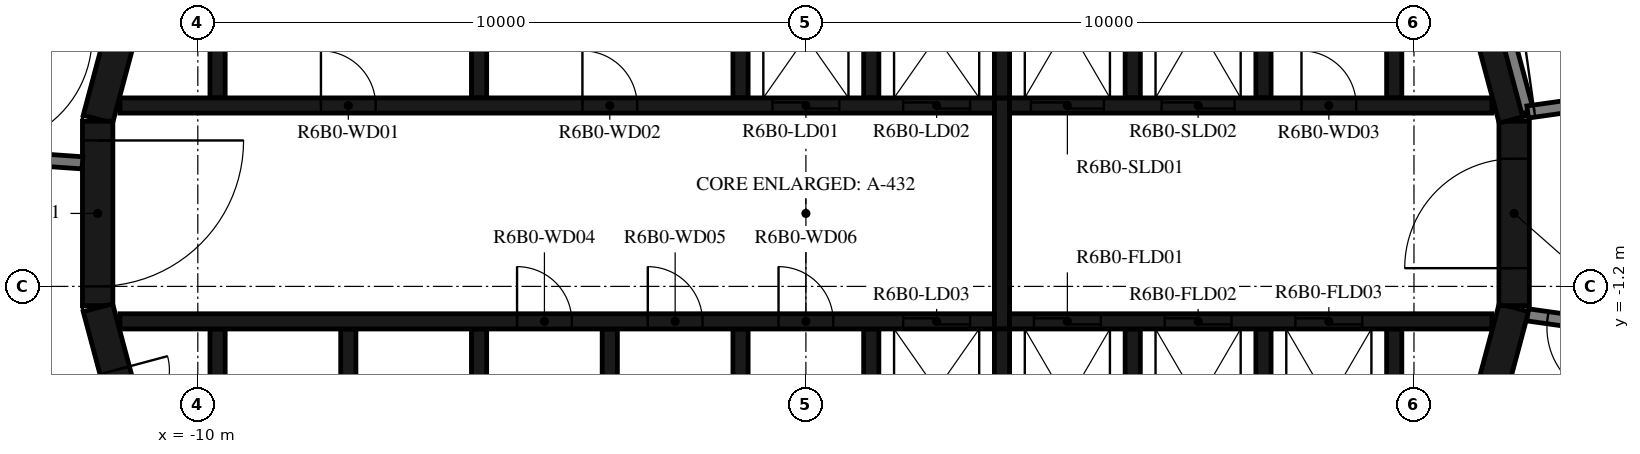
"""IFC4 building model, lengths in metres.
Left out: names, types, materials, properties, quantities, classifications, styles, units other than length and angle.
Written with IfcOpenShell. Run it as: python <this file> out.ifc"""

import sys

from ifc_helpers import new_model, si_unit, direction, frame, frame_2d, origin, place, context, subcontext, project, spatial, polyline, rectangle, outline, extrude, element, fill, save


model = new_model("IFC4")
c1 = context("Model", 3, precision=1e-05, world=origin(), true_north=direction((0.0, 1.0)))
c2 = subcontext(c1, "Body", "Model", "MODEL_VIEW")
j1 = project(units=[si_unit("LENGTHUNIT", "METRE"), si_unit("PLANEANGLEUNIT", "RADIAN")], contexts=[c1])
p1 = place(None, origin())
s1 = spatial("IfcSite", under=j1, at=p1, CompositionType="ELEMENT")
p2 = place(p1, origin())
s2 = spatial("IfcBuilding", under=s1, at=p2, CompositionType="ELEMENT")
p3 = place(p2, frame((0.0, 0.0, 240.7)))
s3 = spatial("IfcBuildingStorey", under=s2, at=p3, CompositionType="ELEMENT", Elevation=240.7)
p4 = place(p3, frame((10.858, -4.479, 0.0), z_axis=(0.0, 0.0, 1.0), x_axis=(0.258734743916, 0.965948410781, 0.0)))
e1 = element("IfcWall", 1, at=p4, inside=s3, PredefinedType="SHEAR", context=c2, shape_type="SweptSolid", body=[
    extrude(rectangle(XDim=3.033, YDim=0.5, at=frame_2d((1.516, 0.0))), origin(), (0.0, 0.0, 1.0), 3.12),
])
p5 = place(p3, frame((11.647, -1.516, 0.0), z_axis=(0.0, 0.0, 1.0), x_axis=(0.0, 1.0, 0.0)))
e2 = element("IfcWall", 2, at=p5, inside=s3, PredefinedType="SHEAR", context=c2, shape_type="SweptSolid", body=[
    extrude(rectangle(XDim=3.033, YDim=0.5, at=frame_2d((1.516, 0.0))), origin(), (0.0, 0.0, 1.0), 3.12),
])
p6 = place(p5, frame((0.616, 0.0, 0.0)))
e3 = element("IfcOpeningElement", 3, at=p6, cuts=e2, PredefinedType="OPENING", context=c2, shape_type="SweptSolid", body=[
    extrude(rectangle(XDim=1.8, YDim=2.1, at=frame_2d((0.9, 1.05))), frame((0.0, 0.26, 0.0), z_axis=(0.0, -1.0, 0.0), x_axis=(1.0, 0.0, 0.0)), (0.0, 0.0, 1.0), 0.52),
])
for number, where, z_axis, x_axis in (
    (4, (11.643, 1.55, 0.0), (0.0, 0.0, 1.0), (-0.259, 0.966, 0.0)),
    (5, (-10.858, 4.479, 0.0), (0.0, 0.0, 1.0), (-0.259, -0.966, 0.0)),
):
    element("IfcWall", number, at=place(p3, frame(where, z_axis=z_axis, x_axis=x_axis)), inside=s3, PredefinedType="SHEAR", context=c2, shape_type="SweptSolid", body=[
        extrude(rectangle(XDim=3.033, YDim=0.5, at=frame_2d((1.516, 0.0))), origin(), (0.0, 0.0, 1.0), 3.12),
    ])
p7 = place(p3, frame((-11.647, 1.516, 0.0), z_axis=(0.0, 0.0, 1.0), x_axis=(0.0, -1.0, 0.0)))
e6 = element("IfcWall", 6, at=p7, inside=s3, PredefinedType="SHEAR", context=c2, shape_type="SweptSolid", body=[
    extrude(rectangle(XDim=3.033, YDim=0.5, at=frame_2d((1.516, 0.0))), origin(), (0.0, 0.0, 1.0), 3.12),
])
p8 = place(p7, frame((0.316, 0.0, 0.0)))
e7 = element("IfcOpeningElement", 7, at=p8, cuts=e6, PredefinedType="OPENING", context=c2, shape_type="SweptSolid", body=[
    extrude(rectangle(XDim=2.4, YDim=2.1, at=frame_2d((1.2, 1.05))), frame((0.0, 0.26, 0.0), z_axis=(0.0, -1.0, 0.0), x_axis=(1.0, 0.0, 0.0)), (0.0, 0.0, 1.0), 0.52),
])
p9 = place(p3, frame((-11.643, -1.55, 0.0), z_axis=(0.0, 0.0, 1.0), x_axis=(0.258734743916, -0.965948410781, 0.0)))
e8 = element("IfcWall", 8, at=p9, inside=s3, PredefinedType="SHEAR", context=c2, shape_type="SweptSolid", body=[
    extrude(rectangle(XDim=3.033, YDim=0.5, at=frame_2d((1.516, 0.0))), origin(), (0.0, 0.0, 1.0), 3.12),
])
p10 = place(p9, frame((1.066, 0.0, 0.0)))
e9 = element("IfcOpeningElement", 9, at=p10, cuts=e8, PredefinedType="OPENING", context=c2, shape_type="SweptSolid", body=[
    extrude(rectangle(XDim=0.9, YDim=2.1, at=frame_2d((0.45, 1.05))), frame((0.0, 0.26, 0.0), z_axis=(0.0, -1.0, 0.0), x_axis=(1.0, 0.0, 0.0)), (0.0, 0.0, 1.0), 0.52),
])
p11 = place(p3, origin())
e10 = element("IfcWall", 10, at=p11, inside=s3, PredefinedType="SHEAR", context=c2, shape_type="SweptSolid", body=[
    extrude(outline(polyline([(-9.55, 4.8), (-5.5, 4.8), (-5.5, 1.9), (-5.25, 1.9), (-5.25, 4.8), (-1.2, 4.8), (-1.2, 1.9), (-0.95, 1.9), (-0.95, 4.8), (0.95, 4.8), (0.95, 1.9), (1.2, 1.9), (1.2, 4.8), (3.1, 4.8), (3.1, 1.9), (3.35, 1.9), (3.35, 4.8), (5.25, 4.8), (5.25, 1.9), (5.5, 1.9), (5.5, 4.8), (7.4, 4.8), (7.4, 1.9), (7.65, 1.9), (7.65, 4.8), (9.55, 4.8), (9.55, 1.9), (9.8, 1.9), (9.8, 4.8), (9.8, 5.05), (-9.8, 5.05), (-9.8, 4.8), (-9.8, 1.9), (-9.55, 1.9), (-9.55, 4.8)])), origin(), (0.0, 0.0, 1.0), 3.12),
])
p12 = place(p3, origin())
e11 = element("IfcWall", 11, at=p12, inside=s3, PredefinedType="SHEAR", context=c2, shape_type="SweptSolid", body=[
    extrude(outline(polyline([(9.8, -5.05), (9.8, -4.8), (9.8, -1.9), (9.55, -1.9), (9.55, -4.8), (7.65, -4.8), (7.65, -1.9), (7.4, -1.9), (7.4, -4.8), (5.5, -4.8), (5.5, -1.9), (5.25, -1.9), (5.25, -4.8), (3.35, -4.8), (3.35, -1.9), (3.1, -1.9), (3.1, -4.8), (1.2, -4.8), (1.2, -1.9), (0.95, -1.9), (0.95, -4.8), (-0.95, -4.8), (-0.95, -1.9), (-1.2, -1.9), (-1.2, -4.8), (-3.1, -4.8), (-3.1, -1.9), (-3.35, -1.9), (-3.35, -4.8), (-5.25, -4.8), (-5.25, -1.9), (-5.5, -1.9), (-5.5, -4.8), (-7.4, -4.8), (-7.4, -1.9), (-7.65, -1.9), (-7.65, -4.8), (-9.55, -4.8), (-9.55, -1.9), (-9.8, -1.9), (-9.8, -4.8), (-9.8, -5.05), (9.8, -5.05)])), origin(), (0.0, 0.0, 1.0), 3.12),
])
p13 = place(p3, frame((-11.28, 1.775, 0.0), z_axis=(0.0, 0.0, 1.0), x_axis=(1.0, 0.0, 0.0)))
e12 = element("IfcWall", 12, at=p13, inside=s3, PredefinedType="SHEAR", context=c2, shape_type="SweptSolid", body=[
    extrude(rectangle(XDim=14.38, YDim=0.25, at=frame_2d((7.19, 0.0))), origin(), (0.0, 0.0, 1.0), 3.12),
])
p14 = place(p13, frame((10.73, 0.0, 0.0)))
e13 = element("IfcOpeningElement", 13, at=p14, cuts=e12, PredefinedType="OPENING", context=c2, shape_type="SweptSolid", body=[
    extrude(rectangle(XDim=1.1, YDim=2.1, at=frame_2d((0.55, 1.05))), frame((0.0, 0.135, 0.0), z_axis=(0.0, -1.0, 0.0), x_axis=(1.0, 0.0, 0.0)), (0.0, 0.0, 1.0), 0.27),
])
p15 = place(p13, frame((12.88, 0.0, 0.0)))
e14 = element("IfcOpeningElement", 14, at=p15, cuts=e12, PredefinedType="OPENING", context=c2, shape_type="SweptSolid", body=[
    extrude(rectangle(XDim=1.1, YDim=2.1, at=frame_2d((0.55, 1.05))), frame((0.0, 0.135, 0.0), z_axis=(0.0, -1.0, 0.0), x_axis=(1.0, 0.0, 0.0)), (0.0, 0.0, 1.0), 0.27),
])
p16 = place(p13, frame((3.305, 0.0, 0.0)))
e15 = element("IfcOpeningElement", 15, at=p16, cuts=e12, PredefinedType="OPENING", context=c2, shape_type="SweptSolid", body=[
    extrude(rectangle(XDim=0.9, YDim=2.1, at=frame_2d((0.45, 1.05))), frame((0.0, 0.135, 0.0), z_axis=(0.0, -1.0, 0.0), x_axis=(1.0, 0.0, 0.0)), (0.0, 0.0, 1.0), 0.27),
])
p17 = place(p13, frame((7.605, 0.0, 0.0)))
e16 = element("IfcOpeningElement", 16, at=p17, cuts=e12, PredefinedType="OPENING", context=c2, shape_type="SweptSolid", body=[
    extrude(rectangle(XDim=0.9, YDim=2.1, at=frame_2d((0.45, 1.05))), frame((0.0, 0.135, 0.0), z_axis=(0.0, -1.0, 0.0), x_axis=(1.0, 0.0, 0.0)), (0.0, 0.0, 1.0), 0.27),
])
p18 = place(p3, frame((3.35, 1.775, 0.0), z_axis=(0.0, 0.0, 1.0), x_axis=(1.0, 0.0, 0.0)))
e17 = element("IfcWall", 17, at=p18, inside=s3, PredefinedType="SHEAR", context=c2, shape_type="SweptSolid", body=[
    extrude(rectangle(XDim=7.93, YDim=0.25, at=frame_2d((3.965, 0.0))), origin(), (0.0, 0.0, 1.0), 3.12),
])
p19 = place(p18, frame((0.35, 0.0, 0.0)))
e18 = element("IfcOpeningElement", 18, at=p19, cuts=e17, PredefinedType="OPENING", context=c2, shape_type="SweptSolid", body=[
    extrude(rectangle(XDim=1.2, YDim=2.4, at=frame_2d((0.6, 1.2))), frame((0.0, 0.135, 0.0), z_axis=(0.0, -1.0, 0.0), x_axis=(1.0, 0.0, 0.0)), (0.0, 0.0, 1.0), 0.27),
])
p20 = place(p18, frame((2.5, 0.0, 0.0)))
e19 = element("IfcOpeningElement", 19, at=p20, cuts=e17, PredefinedType="OPENING", context=c2, shape_type="SweptSolid", body=[
    extrude(rectangle(XDim=1.2, YDim=2.4, at=frame_2d((0.6, 1.2))), frame((0.0, 0.135, 0.0), z_axis=(0.0, -1.0, 0.0), x_axis=(1.0, 0.0, 0.0)), (0.0, 0.0, 1.0), 0.27),
])
p21 = place(p18, frame((4.8, 0.0, 0.0)))
e20 = element("IfcOpeningElement", 20, at=p21, cuts=e17, PredefinedType="OPENING", context=c2, shape_type="SweptSolid", body=[
    extrude(rectangle(XDim=0.9, YDim=2.1, at=frame_2d((0.45, 1.05))), frame((0.0, 0.135, 0.0), z_axis=(0.0, -1.0, 0.0), x_axis=(1.0, 0.0, 0.0)), (0.0, 0.0, 1.0), 0.27),
])
p22 = place(p3, frame((-11.28, -1.775, 0.0), z_axis=(0.0, 0.0, 1.0), x_axis=(1.0, 0.0, 0.0)))
e21 = element("IfcWall", 21, at=p22, inside=s3, PredefinedType="SHEAR", context=c2, shape_type="SweptSolid", body=[
    extrude(rectangle(XDim=14.38, YDim=0.25, at=frame_2d((7.19, 0.0))), origin(), (0.0, 0.0, 1.0), 3.12),
])
p23 = place(p22, frame((12.88, 0.0, 0.0)))
e22 = element("IfcOpeningElement", 22, at=p23, cuts=e21, PredefinedType="OPENING", context=c2, shape_type="SweptSolid", body=[
    extrude(rectangle(XDim=1.1, YDim=2.1, at=frame_2d((0.55, 1.05))), frame((0.0, 0.135, 0.0), z_axis=(0.0, -1.0, 0.0), x_axis=(1.0, 0.0, 0.0)), (0.0, 0.0, 1.0), 0.27),
])
p24 = place(p22, frame((6.53, 0.0, 0.0)))
e23 = element("IfcOpeningElement", 23, at=p24, cuts=e21, PredefinedType="OPENING", context=c2, shape_type="SweptSolid", body=[
    extrude(rectangle(XDim=0.9, YDim=2.1, at=frame_2d((0.45, 1.05))), frame((0.0, 0.135, 0.0), z_axis=(0.0, -1.0, 0.0), x_axis=(1.0, 0.0, 0.0)), (0.0, 0.0, 1.0), 0.27),
])
p25 = place(p22, frame((8.68, 0.0, 0.0)))
e24 = element("IfcOpeningElement", 24, at=p25, cuts=e21, PredefinedType="OPENING", context=c2, shape_type="SweptSolid", body=[
    extrude(rectangle(XDim=0.9, YDim=2.1, at=frame_2d((0.45, 1.05))), frame((0.0, 0.135, 0.0), z_axis=(0.0, -1.0, 0.0), x_axis=(1.0, 0.0, 0.0)), (0.0, 0.0, 1.0), 0.27),
])
p26 = place(p22, frame((10.83, 0.0, 0.0)))
e25 = element("IfcOpeningElement", 25, at=p26, cuts=e21, PredefinedType="OPENING", context=c2, shape_type="SweptSolid", body=[
    extrude(rectangle(XDim=0.9, YDim=2.1, at=frame_2d((0.45, 1.05))), frame((0.0, 0.135, 0.0), z_axis=(0.0, -1.0, 0.0), x_axis=(1.0, 0.0, 0.0)), (0.0, 0.0, 1.0), 0.27),
])
p27 = place(p3, frame((3.35, -1.775, 0.0), z_axis=(0.0, 0.0, 1.0), x_axis=(1.0, 0.0, 0.0)))
e26 = element("IfcWall", 26, at=p27, inside=s3, PredefinedType="SHEAR", context=c2, shape_type="SweptSolid", body=[
    extrude(rectangle(XDim=7.93, YDim=0.25, at=frame_2d((3.965, 0.0))), origin(), (0.0, 0.0, 1.0), 3.12),
])
p28 = place(p27, frame((0.4, 0.0, 0.0)))
e27 = element("IfcOpeningElement", 27, at=p28, cuts=e26, PredefinedType="OPENING", context=c2, shape_type="SweptSolid", body=[
    extrude(rectangle(XDim=1.1, YDim=2.4, at=frame_2d((0.55, 1.2))), frame((0.0, 0.135, 0.0), z_axis=(0.0, -1.0, 0.0), x_axis=(1.0, 0.0, 0.0)), (0.0, 0.0, 1.0), 0.27),
])
p29 = place(p27, frame((2.55, 0.0, 0.0)))
e28 = element("IfcOpeningElement", 28, at=p29, cuts=e26, PredefinedType="OPENING", context=c2, shape_type="SweptSolid", body=[
    extrude(rectangle(XDim=1.1, YDim=2.4, at=frame_2d((0.55, 1.2))), frame((0.0, 0.135, 0.0), z_axis=(0.0, -1.0, 0.0), x_axis=(1.0, 0.0, 0.0)), (0.0, 0.0, 1.0), 0.27),
])
p30 = place(p27, frame((4.7, 0.0, 0.0)))
e29 = element("IfcOpeningElement", 29, at=p30, cuts=e26, PredefinedType="OPENING", context=c2, shape_type="SweptSolid", body=[
    extrude(rectangle(XDim=1.1, YDim=2.4, at=frame_2d((0.55, 1.2))), frame((0.0, 0.135, 0.0), z_axis=(0.0, -1.0, 0.0), x_axis=(1.0, 0.0, 0.0)), (0.0, 0.0, 1.0), 0.27),
])
p31 = place(p3, frame((3.225, -1.9, 0.0), z_axis=(0.0, 0.0, 1.0), x_axis=(0.0, 1.0, 0.0)))
e30 = element("IfcWall", 30, at=p31, inside=s3, PredefinedType="SHEAR", context=c2, shape_type="SweptSolid", body=[
    extrude(rectangle(XDim=3.8, YDim=0.25, at=frame_2d((1.9, 0.0))), origin(), (0.0, 0.0, 1.0), 3.12),
])
p32 = place(p3, frame((11.87, 1.668, 0.0), z_axis=(0.0, 0.0, 1.0), x_axis=(-0.258836880648, 0.965921047093, 0.0)))
e31 = element("IfcWall", 31, at=p32, inside=s3, PredefinedType="STANDARD", context=c2, shape_type="SweptSolid", body=[
    extrude(rectangle(XDim=1.695, YDim=0.2, at=frame_2d((0.848, 0.0))), origin(), (0.0, 0.0, 1.0), 3.12),
])
p33 = place(p3, frame((11.87, 1.668, 0.0), z_axis=(0.0, 0.0, 1.0), x_axis=(0.990267985606, 0.139173692496, 0.0)))
e32 = element("IfcWall", 32, at=p33, inside=s3, PredefinedType="STANDARD", context=c2, shape_type="SweptSolid", body=[
    extrude(rectangle(XDim=1.475, YDim=0.2, at=frame_2d((0.738, 0.0))), origin(), (0.0, 0.0, 1.0), 3.12),
])
p34 = place(p33, frame((0.11, 0.0, 0.0)))
e33 = element("IfcOpeningElement", 33, at=p34, cuts=e32, PredefinedType="OPENING", context=c2, shape_type="SweptSolid", body=[
    extrude(rectangle(XDim=1.2, YDim=2.1, at=frame_2d((0.6, 1.05))), frame((0.0, 0.11, 0.0), z_axis=(0.0, -1.0, 0.0), x_axis=(1.0, 0.0, 0.0)), (0.0, 0.0, 1.0), 0.22),
])
p35 = place(p3, frame((-13.454, 0.941, 0.0), z_axis=(0.0, 0.0, 1.0), x_axis=(0.99755155062, -0.069934997354, 0.0)))
e34 = element("IfcWall", 34, at=p35, inside=s3, PredefinedType="STANDARD", context=c2, shape_type="SweptSolid", body=[
    extrude(rectangle(XDim=1.561, YDim=0.2, at=frame_2d((0.78, 0.0))), origin(), (0.0, 0.0, 1.0), 3.12),
])
p36 = place(p3, frame((13.496, -1.897, 0.0), z_axis=(0.0, 0.0, 1.0), x_axis=(-0.99026234641, 0.139213811391, 0.0)))
e35 = element("IfcWall", 35, at=p36, inside=s3, PredefinedType="STANDARD", context=c2, shape_type="SweptSolid", body=[
    extrude(rectangle(XDim=1.641, YDim=0.2, at=frame_2d((0.821, 0.0))), origin(), (0.0, 0.0, 1.0), 3.12),
])
p37 = place(p36, frame((0.11, 0.0, 0.0)))
e36 = element("IfcOpeningElement", 36, at=p37, cuts=e35, PredefinedType="OPENING", context=c2, shape_type="SweptSolid", body=[
    extrude(rectangle(XDim=1.2, YDim=2.1, at=frame_2d((0.6, 1.05))), frame((0.0, 0.11, 0.0), z_axis=(0.0, -1.0, 0.0), x_axis=(1.0, 0.0, 0.0)), (0.0, 0.0, 1.0), 0.22),
])
p38 = place(p8, origin())
e37 = element("IfcDoor", 37, at=p38, inside=s3, OperationType="DOUBLE_DOOR_SINGLE_SWING", PredefinedType="DOOR", context=c2, shape_type="SweptSolid", body=[
    extrude(rectangle(XDim=2.4, YDim=2.1, at=frame_2d((1.2, 1.05))), frame((0.0, 0.025, 0.0), z_axis=(0.0, -1.0, 0.0), x_axis=(1.0, 0.0, 0.0)), (0.0, 0.0, 1.0), 0.05),
])
fill(e7, e37)
p39 = place(p6, origin())
e38 = element("IfcDoor", 38, at=p39, inside=s3, OperationType="DOUBLE_DOOR_SINGLE_SWING", PredefinedType="DOOR", context=c2, shape_type="SweptSolid", body=[
    extrude(rectangle(XDim=1.8, YDim=2.1, at=frame_2d((0.9, 1.05))), frame((0.0, 0.025, 0.0), z_axis=(0.0, -1.0, 0.0), x_axis=(1.0, 0.0, 0.0)), (0.0, 0.0, 1.0), 0.05),
])
fill(e3, e38)
p40 = place(p14, origin())
e39 = element("IfcDoor", 39, at=p40, inside=s3, OperationType="DOUBLE_DOOR_SLIDING", PredefinedType="DOOR", context=c2, shape_type="SweptSolid", body=[
    extrude(rectangle(XDim=1.1, YDim=2.1, at=frame_2d((0.55, 1.05))), frame((0.0, 0.025, 0.0), z_axis=(0.0, -1.0, 0.0), x_axis=(1.0, 0.0, 0.0)), (0.0, 0.0, 1.0), 0.05),
])
fill(e13, e39)
p41 = place(p15, origin())
e40 = element("IfcDoor", 40, at=p41, inside=s3, OperationType="DOUBLE_DOOR_SLIDING", PredefinedType="DOOR", context=c2, shape_type="SweptSolid", body=[
    extrude(rectangle(XDim=1.1, YDim=2.1, at=frame_2d((0.55, 1.05))), frame((0.0, 0.025, 0.0), z_axis=(0.0, -1.0, 0.0), x_axis=(1.0, 0.0, 0.0)), (0.0, 0.0, 1.0), 0.05),
])
fill(e14, e40)
p42 = place(p19, origin())
e41 = element("IfcDoor", 41, at=p42, inside=s3, OperationType="DOUBLE_DOOR_SLIDING", PredefinedType="DOOR", context=c2, shape_type="SweptSolid", body=[
    extrude(rectangle(XDim=1.2, YDim=2.4, at=frame_2d((0.6, 1.2))), frame((0.0, 0.025, 0.0), z_axis=(0.0, -1.0, 0.0), x_axis=(1.0, 0.0, 0.0)), (0.0, 0.0, 1.0), 0.05),
])
fill(e18, e41)
p43 = place(p20, origin())
e42 = element("IfcDoor", 42, at=p43, inside=s3, OperationType="DOUBLE_DOOR_SLIDING", PredefinedType="DOOR", context=c2, shape_type="SweptSolid", body=[
    extrude(rectangle(XDim=1.2, YDim=2.4, at=frame_2d((0.6, 1.2))), frame((0.0, 0.025, 0.0), z_axis=(0.0, -1.0, 0.0), x_axis=(1.0, 0.0, 0.0)), (0.0, 0.0, 1.0), 0.05),
])
fill(e19, e42)
p44 = place(p23, origin())
e43 = element("IfcDoor", 43, at=p44, inside=s3, OperationType="DOUBLE_DOOR_SLIDING", PredefinedType="DOOR", context=c2, shape_type="SweptSolid", body=[
    extrude(rectangle(XDim=1.1, YDim=2.1, at=frame_2d((0.55, 1.05))), frame((0.0, 0.025, 0.0), z_axis=(0.0, -1.0, 0.0), x_axis=(1.0, 0.0, 0.0)), (0.0, 0.0, 1.0), 0.05),
])
fill(e22, e43)
p45 = place(p28, origin())
e44 = element("IfcDoor", 44, at=p45, inside=s3, OperationType="DOUBLE_DOOR_SLIDING", PredefinedType="DOOR", context=c2, shape_type="SweptSolid", body=[
    extrude(rectangle(XDim=1.1, YDim=2.4, at=frame_2d((0.55, 1.2))), frame((0.0, 0.025, 0.0), z_axis=(0.0, -1.0, 0.0), x_axis=(1.0, 0.0, 0.0)), (0.0, 0.0, 1.0), 0.05),
])
fill(e27, e44)
p46 = place(p29, origin())
e45 = element("IfcDoor", 45, at=p46, inside=s3, OperationType="DOUBLE_DOOR_SLIDING", PredefinedType="DOOR", context=c2, shape_type="SweptSolid", body=[
    extrude(rectangle(XDim=1.1, YDim=2.4, at=frame_2d((0.55, 1.2))), frame((0.0, 0.025, 0.0), z_axis=(0.0, -1.0, 0.0), x_axis=(1.0, 0.0, 0.0)), (0.0, 0.0, 1.0), 0.05),
])
fill(e28, e45)
p47 = place(p30, origin())
e46 = element("IfcDoor", 46, at=p47, inside=s3, OperationType="DOUBLE_DOOR_SLIDING", PredefinedType="DOOR", context=c2, shape_type="SweptSolid", body=[
    extrude(rectangle(XDim=1.1, YDim=2.4, at=frame_2d((0.55, 1.2))), frame((0.0, 0.025, 0.0), z_axis=(0.0, -1.0, 0.0), x_axis=(1.0, 0.0, 0.0)), (0.0, 0.0, 1.0), 0.05),
])
fill(e29, e46)
p48 = place(p16, origin())
e47 = element("IfcDoor", 47, at=p48, inside=s3, OperationType="SINGLE_SWING_LEFT", PredefinedType="DOOR", context=c2, shape_type="SweptSolid", body=[
    extrude(rectangle(XDim=0.9, YDim=2.1, at=frame_2d((0.45, 1.05))), frame((0.0, 0.025, 0.0), z_axis=(0.0, -1.0, 0.0), x_axis=(1.0, 0.0, 0.0)), (0.0, 0.0, 1.0), 0.05),
])
fill(e15, e47)
p49 = place(p17, origin())
e48 = element("IfcDoor", 48, at=p49, inside=s3, OperationType="SINGLE_SWING_RIGHT", PredefinedType="DOOR", context=c2, shape_type="SweptSolid", body=[
    extrude(rectangle(XDim=0.9, YDim=2.1, at=frame_2d((0.45, 1.05))), frame((0.0, 0.025, 0.0), z_axis=(0.0, -1.0, 0.0), x_axis=(1.0, 0.0, 0.0)), (0.0, 0.0, 1.0), 0.05),
])
fill(e16, e48)
p50 = place(p21, origin())
e49 = element("IfcDoor", 49, at=p50, inside=s3, OperationType="SINGLE_SWING_LEFT", PredefinedType="DOOR", context=c2, shape_type="SweptSolid", body=[
    extrude(rectangle(XDim=0.9, YDim=2.1, at=frame_2d((0.45, 1.05))), frame((0.0, 0.025, 0.0), z_axis=(0.0, -1.0, 0.0), x_axis=(1.0, 0.0, 0.0)), (0.0, 0.0, 1.0), 0.05),
])
fill(e20, e49)
p51 = place(p24, origin())
e50 = element("IfcDoor", 50, at=p51, inside=s3, OperationType="SINGLE_SWING_RIGHT", PredefinedType="DOOR", context=c2, shape_type="SweptSolid", body=[
    extrude(rectangle(XDim=0.9, YDim=2.1, at=frame_2d((0.45, 1.05))), frame((0.0, 0.025, 0.0), z_axis=(0.0, -1.0, 0.0), x_axis=(1.0, 0.0, 0.0)), (0.0, 0.0, 1.0), 0.05),
])
fill(e23, e50)
p52 = place(p25, origin())
e51 = element("IfcDoor", 51, at=p52, inside=s3, OperationType="SINGLE_SWING_LEFT", PredefinedType="DOOR", context=c2, shape_type="SweptSolid", body=[
    extrude(rectangle(XDim=0.9, YDim=2.1, at=frame_2d((0.45, 1.05))), frame((0.0, 0.025, 0.0), z_axis=(0.0, -1.0, 0.0), x_axis=(1.0, 0.0, 0.0)), (0.0, 0.0, 1.0), 0.05),
])
fill(e24, e51)
p53 = place(p26, origin())
e52 = element("IfcDoor", 52, at=p53, inside=s3, OperationType="SINGLE_SWING_RIGHT", PredefinedType="DOOR", context=c2, shape_type="SweptSolid", body=[
    extrude(rectangle(XDim=0.9, YDim=2.1, at=frame_2d((0.45, 1.05))), frame((0.0, 0.025, 0.0), z_axis=(0.0, -1.0, 0.0), x_axis=(1.0, 0.0, 0.0)), (0.0, 0.0, 1.0), 0.05),
])
fill(e25, e52)
p54 = place(p10, origin())
e53 = element("IfcDoor", 53, at=p54, inside=s3, OperationType="SINGLE_SWING_LEFT", PredefinedType="DOOR", context=c2, shape_type="SweptSolid", body=[
    extrude(rectangle(XDim=0.9, YDim=2.1, at=frame_2d((0.45, 1.05))), frame((0.0, 0.025, 0.0), z_axis=(0.0, -1.0, 0.0), x_axis=(1.0, 0.0, 0.0)), (0.0, 0.0, 1.0), 0.05),
])
fill(e9, e53)
p55 = place(p34, origin())
e54 = element("IfcDoor", 54, at=p55, inside=s3, OperationType="DOUBLE_DOOR_SINGLE_SWING", PredefinedType="DOOR", context=c2, shape_type="SweptSolid", body=[
    extrude(rectangle(XDim=1.2, YDim=2.1, at=frame_2d((0.6, 1.05))), frame((0.0, 0.025, 0.0), z_axis=(0.0, -1.0, 0.0), x_axis=(1.0, 0.0, 0.0)), (0.0, 0.0, 1.0), 0.05),
])
fill(e33, e54)
p56 = place(p37, origin())
e55 = element("IfcDoor", 55, at=p56, inside=s3, OperationType="DOUBLE_DOOR_SINGLE_SWING", PredefinedType="DOOR", context=c2, shape_type="SweptSolid", body=[
    extrude(rectangle(XDim=1.2, YDim=2.1, at=frame_2d((0.6, 1.05))), frame((0.0, 0.025, 0.0), z_axis=(0.0, -1.0, 0.0), x_axis=(1.0, 0.0, 0.0)), (0.0, 0.0, 1.0), 0.05),
])
fill(e36, e55)
save(model, sys.argv[1])
